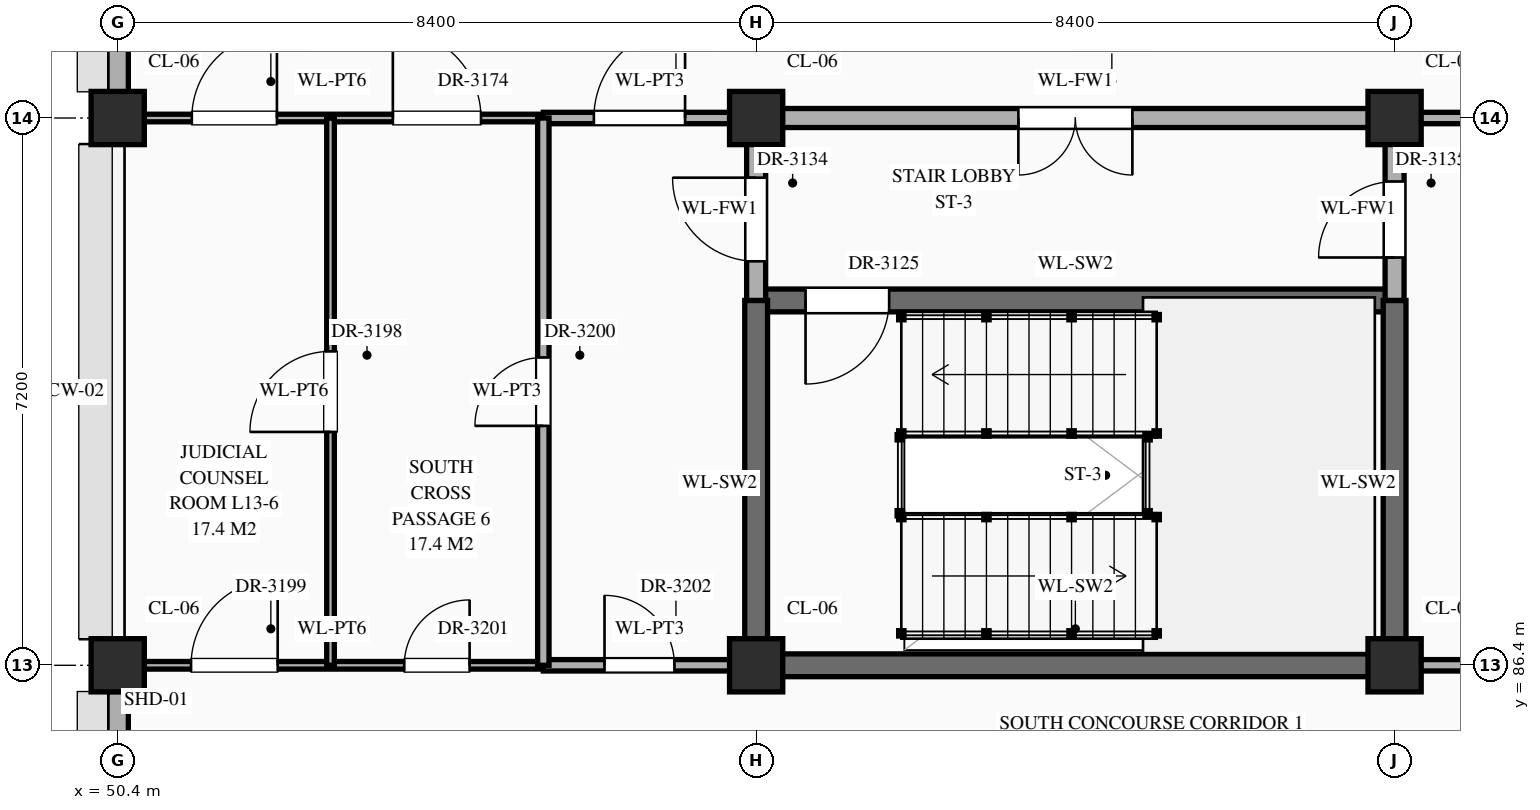
"""IFC4 building model, lengths in metres.
Left out: names, types, materials, properties, quantities, classifications, styles, units other than length and angle.
Written with IfcOpenShell. Run it as: python <this file> out.ifc"""

import sys

from ifc_helpers import new_model, si_unit, direction, frame, frame_2d, origin, origin_2d, place, context, subcontext, project, spatial, rectangle, extrude, element, fill, save


model = new_model("IFC4")
c1 = context("Model", 3, precision=1e-05, world=origin(), true_north=direction((0.0, 1.0)))
c2 = subcontext(c1, "Body", "Model", "MODEL_VIEW")
j1 = project(units=[si_unit("LENGTHUNIT", "METRE"), si_unit("PLANEANGLEUNIT", "RADIAN")], contexts=[c1])
p1 = place(None, origin())
s1 = spatial("IfcSite", under=j1, at=p1, CompositionType="ELEMENT")
p2 = place(p1, origin())
s2 = spatial("IfcBuilding", under=s1, at=p2, CompositionType="ELEMENT")
p3 = place(p2, frame((0.0, 0.0, 56.1)))
s3 = spatial("IfcBuildingStorey", under=s2, at=p3, CompositionType="ELEMENT", Elevation=56.1)
for number, where, z_axis, x_axis in (
    (1, (50.4, 86.4, 0.0), (0.0, 0.0, 1.0), (1.0, 0.0, 0.0)),
    (2, (50.4, 93.6, 0.0), (0.0, 0.0, 1.0), (1.0, 0.0, 0.0)),
    (3, (58.8, 86.4, 0.0), (0.0, 0.0, 1.0), (1.0, 0.0, 0.0)),
    (4, (58.8, 93.6, 0.0), (0.0, 0.0, 1.0), (1.0, 0.0, 0.0)),
    (5, (67.2, 86.4, 0.0), (0.0, 0.0, 1.0), (1.0, 0.0, 0.0)),
    (6, (67.2, 93.6, 0.0), (0.0, 0.0, 1.0), (1.0, 0.0, 0.0)),
):
    element("IfcColumn", number, at=place(p3, frame(where, z_axis=z_axis, x_axis=x_axis)), inside=s3, PredefinedType="COLUMN", context=c2, shape_type="SweptSolid", body=[
        extrude(rectangle(XDim=0.7, YDim=0.7, at=origin_2d()), origin(), (0.0, 0.0, 1.0), 4.2),
    ])
p4 = place(p3, frame((50.4, 79.545, 0.0), z_axis=(0.0, 0.0, 1.0), x_axis=(0.0, 1.0, 0.0)))
e7 = element("IfcWall", 7, at=p4, inside=s3, PredefinedType="STANDARD", context=c2, shape_type="SweptSolid", body=[
    extrude(rectangle(XDim=6.51, YDim=0.28, at=frame_2d((3.255, 0.0))), origin(), (0.0, 0.0, 1.0), 3.2),
])
p5 = place(p4, frame((1.455, 0.0, 0.55)))
e8 = element("IfcOpeningElement", 8, at=p5, cuts=e7, PredefinedType="OPENING", context=c2, shape_type="SweptSolid", body=[
    extrude(rectangle(XDim=1.2, YDim=1.56, at=frame_2d((0.6, 0.78))), frame((0.0, 0.152, 0.0), z_axis=(0.0, -1.0, 0.0), x_axis=(1.0, 0.0, 0.0)), (0.0, 0.0, 1.0), 0.304),
])
p6 = place(p3, frame((50.4, 93.945, 0.0), z_axis=(0.0, 0.0, 1.0), x_axis=(0.0, 1.0, 0.0)))
e9 = element("IfcWall", 9, at=p6, inside=s3, PredefinedType="STANDARD", context=c2, shape_type="SweptSolid", body=[
    extrude(rectangle(XDim=6.51, YDim=0.28, at=frame_2d((3.255, 0.0))), origin(), (0.0, 0.0, 1.0), 3.2),
])
p7 = place(p6, frame((3.78, 0.0, 0.55)))
e10 = element("IfcOpeningElement", 10, at=p7, cuts=e9, PredefinedType="OPENING", context=c2, shape_type="SweptSolid", body=[
    extrude(rectangle(XDim=1.55, YDim=1.92, at=frame_2d((0.775, 0.96))), frame((0.0, 0.152, 0.0), z_axis=(0.0, -1.0, 0.0), x_axis=(1.0, 0.0, 0.0)), (0.0, 0.0, 1.0), 0.304),
])
p8 = place(p3, frame((50.44, 86.4, 0.0), z_axis=(0.0, 0.0, 1.0), x_axis=(1.0, 0.0, 0.0)))
e11 = element("IfcWall", 11, at=p8, inside=s3, PredefinedType="STANDARD", context=c2, shape_type="SweptSolid", body=[
    extrude(rectangle(XDim=5.56, YDim=0.1, at=frame_2d((2.78, 0.0))), origin(), (0.0, 0.0, 1.0), 3.0),
])
p9 = place(p8, frame((0.925, 0.0, 0.0)))
e12 = element("IfcOpeningElement", 12, at=p9, cuts=e11, PredefinedType="OPENING", context=c2, shape_type="SweptSolid", body=[
    extrude(rectangle(XDim=1.14, YDim=2.4, at=frame_2d((0.57, 1.2))), frame((0.0, 0.062, 0.0), z_axis=(0.0, -1.0, 0.0), x_axis=(1.0, 0.0, 0.0)), (0.0, 0.0, 1.0), 0.124),
])
p10 = place(p8, frame((3.73, 0.0, 0.0)))
e13 = element("IfcOpeningElement", 13, at=p10, cuts=e11, PredefinedType="OPENING", context=c2, shape_type="SweptSolid", body=[
    extrude(rectangle(XDim=0.86, YDim=2.1, at=frame_2d((0.43, 1.05))), frame((0.0, 0.062, 0.0), z_axis=(0.0, -1.0, 0.0), x_axis=(1.0, 0.0, 0.0)), (0.0, 0.0, 1.0), 0.124),
])
p11 = place(p3, frame((56.0, 86.4, 0.0), z_axis=(0.0, 0.0, 1.0), x_axis=(1.0, 0.0, 0.0)))
e14 = element("IfcWall", 14, at=p11, inside=s3, PredefinedType="STANDARD", context=c2, shape_type="SweptSolid", body=[
    extrude(rectangle(XDim=2.8, YDim=0.15, at=frame_2d((1.4, 0.0))), origin(), (0.0, 0.0, 1.0), 3.0),
])
p12 = place(p11, frame((0.805, 0.0, 0.0)))
e15 = element("IfcOpeningElement", 15, at=p12, cuts=e14, PredefinedType="OPENING", context=c2, shape_type="SweptSolid", body=[
    extrude(rectangle(XDim=0.92, YDim=2.15, at=frame_2d((0.46, 1.075))), frame((0.0, 0.087, 0.0), z_axis=(0.0, -1.0, 0.0), x_axis=(1.0, 0.0, 0.0)), (0.0, 0.0, 1.0), 0.174),
])
p13 = place(p3, frame((58.8, 86.4, 0.0), z_axis=(0.0, 0.0, 1.0), x_axis=(1.0, 0.0, 0.0)))
e16 = element("IfcWall", 16, at=p13, inside=s3, PredefinedType="SHEAR", context=c2, shape_type="SweptSolid", body=[
    extrude(rectangle(XDim=8.4, YDim=0.3, at=frame_2d((4.2, 0.0))), origin(), (0.0, 0.0, 1.0), 3.96),
])
p14 = place(p3, frame((67.2, 86.4, 0.0), z_axis=(0.0, 0.0, 1.0), x_axis=(1.0, 0.0, 0.0)))
e17 = element("IfcWall", 17, at=p14, inside=s3, PredefinedType="STANDARD", context=c2, shape_type="SweptSolid", body=[
    extrude(rectangle(XDim=8.4, YDim=0.15, at=frame_2d((4.2, 0.0))), origin(), (0.0, 0.0, 1.0), 3.11),
])
p15 = place(p14, frame((3.72, 0.0, 0.0)))
e18 = element("IfcOpeningElement", 18, at=p15, cuts=e17, PredefinedType="OPENING", context=c2, shape_type="SweptSolid", body=[
    extrude(rectangle(XDim=0.96, YDim=2.2, at=frame_2d((0.48, 1.1))), frame((0.0, 0.087, 0.0), z_axis=(0.0, -1.0, 0.0), x_axis=(1.0, 0.0, 0.0)), (0.0, 0.0, 1.0), 0.174),
])
p16 = place(p3, frame((58.8, 91.2, 0.0), z_axis=(0.0, 0.0, 1.0), x_axis=(1.0, 0.0, 0.0)))
e19 = element("IfcWall", 19, at=p16, inside=s3, PredefinedType="SHEAR", context=c2, shape_type="SweptSolid", body=[
    extrude(rectangle(XDim=8.4, YDim=0.3, at=frame_2d((4.2, 0.0))), origin(), (0.0, 0.0, 1.0), 3.96),
])
p17 = place(p16, frame((0.65, 0.0, 0.0)))
e20 = element("IfcOpeningElement", 20, at=p17, cuts=e19, PredefinedType="OPENING", context=c2, shape_type="SweptSolid", body=[
    extrude(rectangle(XDim=1.1, YDim=2.2, at=frame_2d((0.55, 1.1))), frame((0.0, 0.162, 0.0), z_axis=(0.0, -1.0, 0.0), x_axis=(1.0, 0.0, 0.0)), (0.0, 0.0, 1.0), 0.324),
])
p18 = place(p3, frame((50.44, 93.6, 0.0), z_axis=(0.0, 0.0, 1.0), x_axis=(1.0, 0.0, 0.0)))
e21 = element("IfcWall", 21, at=p18, inside=s3, PredefinedType="STANDARD", context=c2, shape_type="SweptSolid", body=[
    extrude(rectangle(XDim=5.56, YDim=0.1, at=frame_2d((2.78, 0.0))), origin(), (0.0, 0.0, 1.0), 3.0),
])
p19 = place(p18, frame((0.935, 0.0, 0.0)))
e22 = element("IfcOpeningElement", 22, at=p19, cuts=e21, PredefinedType="OPENING", context=c2, shape_type="SweptSolid", body=[
    extrude(rectangle(XDim=1.12, YDim=2.25, at=frame_2d((0.56, 1.125))), frame((0.0, 0.062, 0.0), z_axis=(0.0, -1.0, 0.0), x_axis=(1.0, 0.0, 0.0)), (0.0, 0.0, 1.0), 0.124),
])
p20 = place(p18, frame((3.58, 0.0, 0.0)))
e23 = element("IfcOpeningElement", 23, at=p20, cuts=e21, PredefinedType="OPENING", context=c2, shape_type="SweptSolid", body=[
    extrude(rectangle(XDim=1.16, YDim=2.3, at=frame_2d((0.58, 1.15))), frame((0.0, 0.062, 0.0), z_axis=(0.0, -1.0, 0.0), x_axis=(1.0, 0.0, 0.0)), (0.0, 0.0, 1.0), 0.124),
])
p21 = place(p3, frame((56.0, 93.6, 0.0), z_axis=(0.0, 0.0, 1.0), x_axis=(1.0, 0.0, 0.0)))
e24 = element("IfcWall", 24, at=p21, inside=s3, PredefinedType="STANDARD", context=c2, shape_type="SweptSolid", body=[
    extrude(rectangle(XDim=2.8, YDim=0.15, at=frame_2d((1.4, 0.0))), origin(), (0.0, 0.0, 1.0), 3.0),
])
p22 = place(p21, frame((0.665, 0.0, 0.0)))
e25 = element("IfcOpeningElement", 25, at=p22, cuts=e24, PredefinedType="OPENING", context=c2, shape_type="SweptSolid", body=[
    extrude(rectangle(XDim=1.2, YDim=2.35, at=frame_2d((0.6, 1.175))), frame((0.0, 0.087, 0.0), z_axis=(0.0, -1.0, 0.0), x_axis=(1.0, 0.0, 0.0)), (0.0, 0.0, 1.0), 0.174),
])
p23 = place(p3, frame((58.8, 93.6, 0.0), z_axis=(0.0, 0.0, 1.0), x_axis=(1.0, 0.0, 0.0)))
e26 = element("IfcWall", 26, at=p23, inside=s3, PredefinedType="STANDARD", context=c2, shape_type="SweptSolid", body=[
    extrude(rectangle(XDim=8.4, YDim=0.25, at=frame_2d((4.2, 0.0))), origin(), (0.0, 0.0, 1.0), 3.11),
])
p24 = place(p23, frame((3.45, 0.0, 0.0)))
e27 = element("IfcOpeningElement", 27, at=p24, cuts=e26, PredefinedType="OPENING", context=c2, shape_type="SweptSolid", body=[
    extrude(rectangle(XDim=1.5, YDim=2.25, at=frame_2d((0.75, 1.125))), frame((0.0, 0.137, 0.0), z_axis=(0.0, -1.0, 0.0), x_axis=(1.0, 0.0, 0.0)), (0.0, 0.0, 1.0), 0.274),
])
p25 = place(p3, frame((67.2, 93.6, 0.0), z_axis=(0.0, 0.0, 1.0), x_axis=(1.0, 0.0, 0.0)))
e28 = element("IfcWall", 28, at=p25, inside=s3, PredefinedType="STANDARD", context=c2, shape_type="SweptSolid", body=[
    extrude(rectangle(XDim=8.4, YDim=0.15, at=frame_2d((4.2, 0.0))), origin(), (0.0, 0.0, 1.0), 3.11),
])
p26 = place(p25, frame((3.58, 0.0, 0.0)))
e29 = element("IfcOpeningElement", 29, at=p26, cuts=e28, PredefinedType="OPENING", context=c2, shape_type="SweptSolid", body=[
    extrude(rectangle(XDim=1.24, YDim=2.3, at=frame_2d((0.62, 1.15))), frame((0.0, 0.087, 0.0), z_axis=(0.0, -1.0, 0.0), x_axis=(1.0, 0.0, 0.0)), (0.0, 0.0, 1.0), 0.174),
])
p27 = place(p3, frame((53.2, 86.4, 0.0), z_axis=(0.0, 0.0, 1.0), x_axis=(0.0, 1.0, 0.0)))
e30 = element("IfcWall", 30, at=p27, inside=s3, PredefinedType="STANDARD", context=c2, shape_type="SweptSolid", body=[
    extrude(rectangle(XDim=7.2, YDim=0.1, at=frame_2d((3.6, 0.0))), origin(), (0.0, 0.0, 1.0), 3.85),
])
p28 = place(p27, frame((3.07, 0.0, 0.0)))
e31 = element("IfcOpeningElement", 31, at=p28, cuts=e30, PredefinedType="OPENING", context=c2, shape_type="SweptSolid", body=[
    extrude(rectangle(XDim=1.06, YDim=2.4, at=frame_2d((0.53, 1.2))), frame((0.0, 0.062, 0.0), z_axis=(0.0, -1.0, 0.0), x_axis=(1.0, 0.0, 0.0)), (0.0, 0.0, 1.0), 0.124),
])
p29 = place(p3, frame((56.0, 86.4, 0.0), z_axis=(0.0, 0.0, 1.0), x_axis=(0.0, 1.0, 0.0)))
e32 = element("IfcWall", 32, at=p29, inside=s3, PredefinedType="STANDARD", context=c2, shape_type="SweptSolid", body=[
    extrude(rectangle(XDim=7.2, YDim=0.15, at=frame_2d((3.6, 0.0))), origin(), (0.0, 0.0, 1.0), 3.85),
])
p30 = place(p29, frame((3.15, 0.0, 0.0)))
e33 = element("IfcOpeningElement", 33, at=p30, cuts=e32, PredefinedType="OPENING", context=c2, shape_type="SweptSolid", body=[
    extrude(rectangle(XDim=0.9, YDim=2.15, at=frame_2d((0.45, 1.075))), frame((0.0, 0.087, 0.0), z_axis=(0.0, -1.0, 0.0), x_axis=(1.0, 0.0, 0.0)), (0.0, 0.0, 1.0), 0.174),
])
p31 = place(p3, frame((58.8, 86.4, 0.0), z_axis=(0.0, 0.0, 1.0), x_axis=(0.0, 1.0, 0.0)))
e34 = element("IfcWall", 34, at=p31, inside=s3, PredefinedType="SHEAR", context=c2, shape_type="SweptSolid", body=[
    extrude(rectangle(XDim=4.8, YDim=0.3, at=frame_2d((2.4, 0.0))), origin(), (0.0, 0.0, 1.0), 3.85),
])
p32 = place(p3, frame((58.8, 91.2, 0.0), z_axis=(0.0, 0.0, 1.0), x_axis=(0.0, 1.0, 0.0)))
e35 = element("IfcWall", 35, at=p32, inside=s3, PredefinedType="STANDARD", context=c2, shape_type="SweptSolid", body=[
    extrude(rectangle(XDim=2.4, YDim=0.25, at=frame_2d((1.2, 0.0))), origin(), (0.0, 0.0, 1.0), 3.1),
])
p33 = place(p32, frame((0.515, 0.0, 0.0)))
e36 = element("IfcOpeningElement", 36, at=p33, cuts=e35, PredefinedType="OPENING", context=c2, shape_type="SweptSolid", body=[
    extrude(rectangle(XDim=1.1, YDim=2.2, at=frame_2d((0.55, 1.1))), frame((0.0, 0.137, 0.0), z_axis=(0.0, -1.0, 0.0), x_axis=(1.0, 0.0, 0.0)), (0.0, 0.0, 1.0), 0.274),
])
p34 = place(p3, frame((67.2, 86.4, 0.0), z_axis=(0.0, 0.0, 1.0), x_axis=(0.0, 1.0, 0.0)))
e37 = element("IfcWall", 37, at=p34, inside=s3, PredefinedType="SHEAR", context=c2, shape_type="SweptSolid", body=[
    extrude(rectangle(XDim=4.8, YDim=0.3, at=frame_2d((2.4, 0.0))), origin(), (0.0, 0.0, 1.0), 3.96),
])
p35 = place(p3, frame((67.2, 91.2, 0.0), z_axis=(0.0, 0.0, 1.0), x_axis=(0.0, 1.0, 0.0)))
e38 = element("IfcWall", 38, at=p35, inside=s3, PredefinedType="STANDARD", context=c2, shape_type="SweptSolid", body=[
    extrude(rectangle(XDim=2.4, YDim=0.25, at=frame_2d((1.2, 0.0))), origin(), (0.0, 0.0, 1.0), 3.21),
])
p36 = place(p35, frame((0.565, 0.0, 0.0)))
e39 = element("IfcOpeningElement", 39, at=p36, cuts=e38, PredefinedType="OPENING", context=c2, shape_type="SweptSolid", body=[
    extrude(rectangle(XDim=1.0, YDim=2.2, at=frame_2d((0.5, 1.1))), frame((0.0, 0.137, 0.0), z_axis=(0.0, -1.0, 0.0), x_axis=(1.0, 0.0, 0.0)), (0.0, 0.0, 1.0), 0.274),
])
p37 = place(p17, frame((1.1, 0.0, 0.0), z_axis=(0.0, 0.0, 1.0), x_axis=(-1.0, 0.0, 0.0)))
e40 = element("IfcDoor", 40, at=p37, inside=s3, OperationType="SINGLE_SWING_RIGHT", PredefinedType="DOOR", context=c2, shape_type="SweptSolid", body=[
    extrude(rectangle(XDim=1.1, YDim=2.2, at=frame_2d((0.55, 1.1))), frame((0.0, 0.025, 0.0), z_axis=(0.0, -1.0, 0.0), x_axis=(1.0, 0.0, 0.0)), (0.0, 0.0, 1.0), 0.05),
])
fill(e20, e40)
p38 = place(p24, frame((1.5, 0.0, 0.0), z_axis=(0.0, 0.0, 1.0), x_axis=(-1.0, 0.0, 0.0)))
e41 = element("IfcDoor", 41, at=p38, inside=s3, OperationType="DOUBLE_DOOR_SINGLE_SWING", PredefinedType="DOOR", context=c2, shape_type="SweptSolid", body=[
    extrude(rectangle(XDim=1.5, YDim=2.25, at=frame_2d((0.75, 1.125))), frame((0.0, 0.025, 0.0), z_axis=(0.0, -1.0, 0.0), x_axis=(1.0, 0.0, 0.0)), (0.0, 0.0, 1.0), 0.05),
])
fill(e27, e41)
p39 = place(p33, origin())
e42 = element("IfcDoor", 42, at=p39, inside=s3, OperationType="SINGLE_SWING_RIGHT", PredefinedType="DOOR", context=c2, shape_type="SweptSolid", body=[
    extrude(rectangle(XDim=1.1, YDim=2.2, at=frame_2d((0.55, 1.1))), frame((0.0, 0.025, 0.0), z_axis=(0.0, -1.0, 0.0), x_axis=(1.0, 0.0, 0.0)), (0.0, 0.0, 1.0), 0.05),
])
fill(e36, e42)
p40 = place(p36, origin())
e43 = element("IfcDoor", 43, at=p40, inside=s3, OperationType="SINGLE_SWING_LEFT", PredefinedType="DOOR", context=c2, shape_type="SweptSolid", body=[
    extrude(rectangle(XDim=1.0, YDim=2.2, at=frame_2d((0.5, 1.1))), frame((0.0, 0.025, 0.0), z_axis=(0.0, -1.0, 0.0), x_axis=(1.0, 0.0, 0.0)), (0.0, 0.0, 1.0), 0.05),
])
fill(e39, e43)
p41 = place(p19, origin())
e44 = element("IfcDoor", 44, at=p41, inside=s3, OperationType="SINGLE_SWING_RIGHT", PredefinedType="DOOR", context=c2, shape_type="SweptSolid", body=[
    extrude(rectangle(XDim=1.12, YDim=2.25, at=frame_2d((0.56, 1.125))), frame((0.0, 0.025, 0.0), z_axis=(0.0, -1.0, 0.0), x_axis=(1.0, 0.0, 0.0)), (0.0, 0.0, 1.0), 0.05),
])
fill(e22, e44)
p42 = place(p20, origin())
e45 = element("IfcDoor", 45, at=p42, inside=s3, OperationType="SINGLE_SWING_LEFT", PredefinedType="DOOR", context=c2, shape_type="SweptSolid", body=[
    extrude(rectangle(XDim=1.16, YDim=2.3, at=frame_2d((0.58, 1.15))), frame((0.0, 0.025, 0.0), z_axis=(0.0, -1.0, 0.0), x_axis=(1.0, 0.0, 0.0)), (0.0, 0.0, 1.0), 0.05),
])
fill(e23, e45)
p43 = place(p22, origin())
e46 = element("IfcDoor", 46, at=p43, inside=s3, OperationType="SINGLE_SWING_RIGHT", PredefinedType="DOOR", context=c2, shape_type="SweptSolid", body=[
    extrude(rectangle(XDim=1.2, YDim=2.35, at=frame_2d((0.6, 1.175))), frame((0.0, 0.025, 0.0), z_axis=(0.0, -1.0, 0.0), x_axis=(1.0, 0.0, 0.0)), (0.0, 0.0, 1.0), 0.05),
])
fill(e25, e46)
p44 = place(p28, origin())
e47 = element("IfcDoor", 47, at=p44, inside=s3, OperationType="SINGLE_SWING_LEFT", PredefinedType="DOOR", context=c2, shape_type="SweptSolid", body=[
    extrude(rectangle(XDim=1.06, YDim=2.4, at=frame_2d((0.53, 1.2))), frame((0.0, 0.025, 0.0), z_axis=(0.0, -1.0, 0.0), x_axis=(1.0, 0.0, 0.0)), (0.0, 0.0, 1.0), 0.05),
])
fill(e31, e47)
p45 = place(p9, origin())
e48 = element("IfcDoor", 48, at=p45, inside=s3, OperationType="SINGLE_SWING_RIGHT", PredefinedType="DOOR", context=c2, shape_type="SweptSolid", body=[
    extrude(rectangle(XDim=1.14, YDim=2.4, at=frame_2d((0.57, 1.2))), frame((0.0, 0.025, 0.0), z_axis=(0.0, -1.0, 0.0), x_axis=(1.0, 0.0, 0.0)), (0.0, 0.0, 1.0), 0.05),
])
fill(e12, e48)
p46 = place(p30, origin())
e49 = element("IfcDoor", 49, at=p46, inside=s3, OperationType="SINGLE_SWING_LEFT", PredefinedType="DOOR", context=c2, shape_type="SweptSolid", body=[
    extrude(rectangle(XDim=0.9, YDim=2.15, at=frame_2d((0.45, 1.075))), frame((0.0, 0.025, 0.0), z_axis=(0.0, -1.0, 0.0), x_axis=(1.0, 0.0, 0.0)), (0.0, 0.0, 1.0), 0.05),
])
fill(e33, e49)
p47 = place(p10, origin())
e50 = element("IfcDoor", 50, at=p47, inside=s3, OperationType="SINGLE_SWING_RIGHT", PredefinedType="DOOR", context=c2, shape_type="SweptSolid", body=[
    extrude(rectangle(XDim=0.86, YDim=2.1, at=frame_2d((0.43, 1.05))), frame((0.0, 0.025, 0.0), z_axis=(0.0, -1.0, 0.0), x_axis=(1.0, 0.0, 0.0)), (0.0, 0.0, 1.0), 0.05),
])
fill(e13, e50)
p48 = place(p12, origin())
e51 = element("IfcDoor", 51, at=p48, inside=s3, OperationType="SINGLE_SWING_LEFT", PredefinedType="DOOR", context=c2, shape_type="SweptSolid", body=[
    extrude(rectangle(XDim=0.92, YDim=2.15, at=frame_2d((0.46, 1.075))), frame((0.0, 0.025, 0.0), z_axis=(0.0, -1.0, 0.0), x_axis=(1.0, 0.0, 0.0)), (0.0, 0.0, 1.0), 0.05),
])
fill(e15, e51)
save(model, sys.argv[1])
